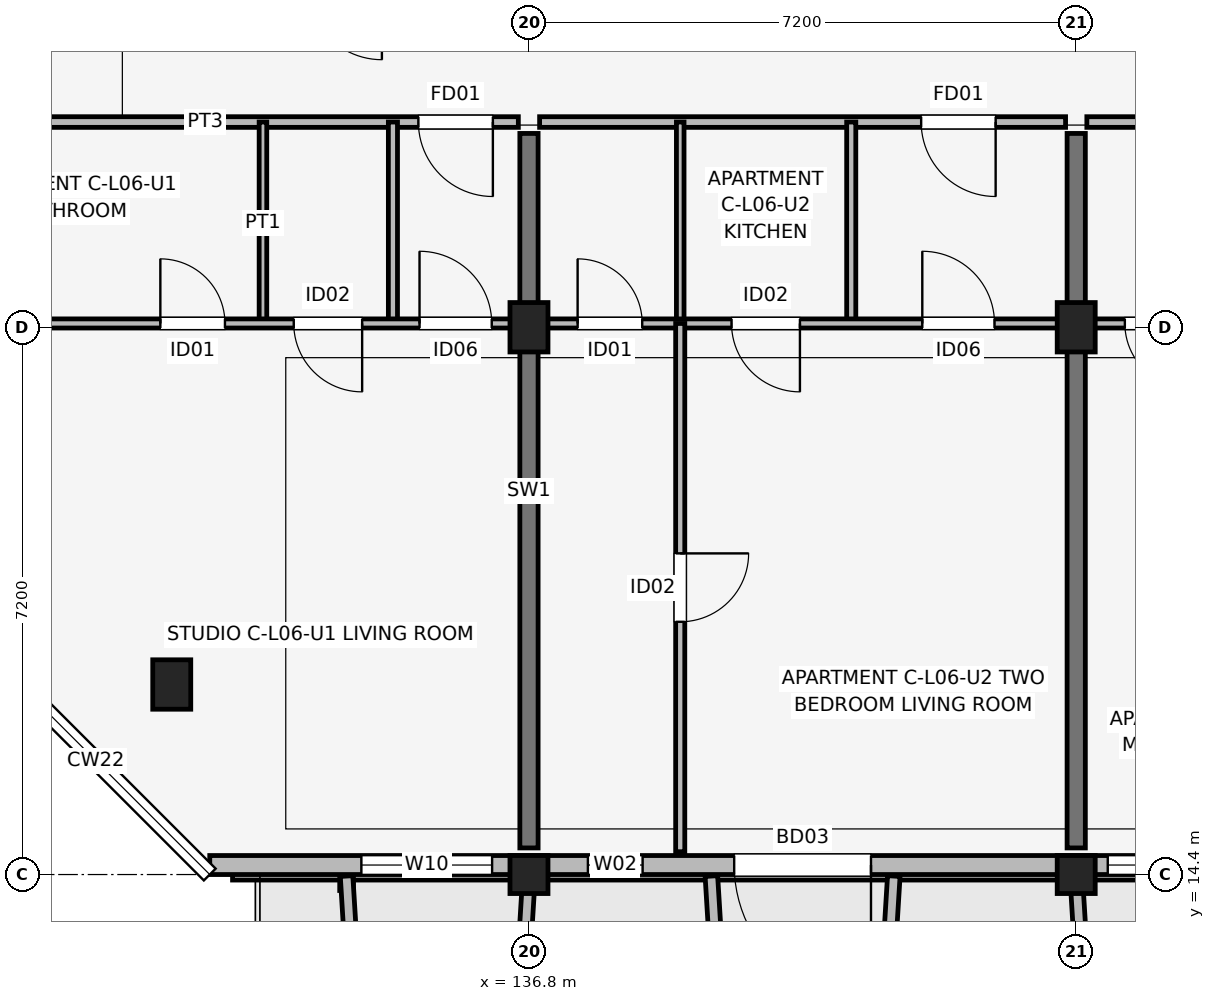
"""IFC4 building model, lengths in metres.
Left out: names, types, materials, properties, quantities, classifications, styles, units other than length and angle.
Written with IfcOpenShell. Run it as: python <this file> out.ifc"""

import sys

from ifc_helpers import new_model, si_unit, direction, frame, frame_2d, origin, origin_2d, place, context, subcontext, project, spatial, rectangle, extrude, element, fill, save


model = new_model("IFC4")
c1 = context("Model", 3, precision=1e-05, world=origin(), true_north=direction((0.0, 1.0)))
c2 = subcontext(c1, "Body", "Model", "MODEL_VIEW")
j1 = project(units=[si_unit("LENGTHUNIT", "METRE"), si_unit("PLANEANGLEUNIT", "RADIAN")], contexts=[c1])
p1 = place(None, origin())
s1 = spatial("IfcSite", under=j1, at=p1, CompositionType="ELEMENT")
p2 = place(p1, origin())
s2 = spatial("IfcBuilding", under=s1, at=p2, CompositionType="ELEMENT")
p3 = place(p2, frame((0.0, 0.0, 21.3)))
s3 = spatial("IfcBuildingStorey", under=s2, at=p3, CompositionType="ELEMENT", Elevation=21.3)
p4 = place(p3, frame((132.1, 16.9, 0.0), z_axis=(0.0, 0.0, 1.0), x_axis=(1.0, 0.0, 0.0)))
e1 = element("IfcColumn", 1, at=p4, inside=s3, PredefinedType="COLUMN", context=c2, shape_type="SweptSolid", body=[
    extrude(rectangle(XDim=0.5, YDim=0.65, at=origin_2d()), origin(), (0.0, 0.0, 1.0), 3.15),
])
p5 = place(p3, frame((136.8, 14.4, 0.0), z_axis=(0.0, 0.0, 1.0), x_axis=(1.0, 0.0, 0.0)))
e2 = element("IfcColumn", 2, at=p5, inside=s3, PredefinedType="COLUMN", context=c2, shape_type="SweptSolid", body=[
    extrude(rectangle(XDim=0.5, YDim=0.5, at=origin_2d()), origin(), (0.0, 0.0, 1.0), 3.15),
])
p6 = place(p3, frame((136.8, 21.6, 0.0), z_axis=(0.0, 0.0, 1.0), x_axis=(1.0, 0.0, 0.0)))
e3 = element("IfcColumn", 3, at=p6, inside=s3, PredefinedType="COLUMN", context=c2, shape_type="SweptSolid", body=[
    extrude(rectangle(XDim=0.5, YDim=0.65, at=origin_2d()), origin(), (0.0, 0.0, 1.0), 3.15),
])
p7 = place(p3, frame((144.0, 14.4, 0.0), z_axis=(0.0, 0.0, 1.0), x_axis=(1.0, 0.0, 0.0)))
e4 = element("IfcColumn", 4, at=p7, inside=s3, PredefinedType="COLUMN", context=c2, shape_type="SweptSolid", body=[
    extrude(rectangle(XDim=0.5, YDim=0.5, at=origin_2d()), origin(), (0.0, 0.0, 1.0), 3.15),
])
p8 = place(p3, frame((144.0, 21.6, 0.0), z_axis=(0.0, 0.0, 1.0), x_axis=(1.0, 0.0, 0.0)))
e5 = element("IfcColumn", 5, at=p8, inside=s3, PredefinedType="COLUMN", context=c2, shape_type="SweptSolid", body=[
    extrude(rectangle(XDim=0.5, YDim=0.65, at=origin_2d()), origin(), (0.0, 0.0, 1.0), 3.15),
])
for number, where, z_axis, x_axis in (
    (6, (136.8, 14.75, 0.0), (0.0, 0.0, 1.0), (0.0, 1.0, 0.0)),
    (7, (144.0, 14.75, 0.0), (0.0, 0.0, 1.0), (0.0, 1.0, 0.0)),
):
    element("IfcWall", number, at=place(p3, frame(where, z_axis=z_axis, x_axis=x_axis)), inside=s3, PredefinedType="SHEAR", context=c2, shape_type="SweptSolid", body=[
        extrude(rectangle(XDim=9.4, YDim=0.24, at=frame_2d((4.7, 0.0))), origin(), (0.0, 0.0, 1.0), 3.15),
    ])
p9 = place(p3, frame((132.6, 14.525, 0.0), z_axis=(0.0, 0.0, 1.0), x_axis=(1.0, 0.0, 0.0)))
e8 = element("IfcWall", 8, at=p9, inside=s3, PredefinedType="SOLIDWALL", context=c2, shape_type="SweptSolid", body=[
    extrude(rectangle(XDim=30.0, YDim=0.25, at=frame_2d((15.0, 0.0))), origin(), (0.0, 0.0, 1.0), 2.43),
])
p10 = place(p9, frame((8.7, 0.0, 0.0), z_axis=(0.0, 0.0, 1.0), x_axis=(-1.0, 0.0, 0.0)))
e9 = element("IfcOpeningElement", 9, at=p10, cuts=e8, PredefinedType="OPENING", context=c2, shape_type="SweptSolid", body=[
    extrude(rectangle(XDim=1.8, YDim=2.15, at=frame_2d((0.9, 1.075))), frame((0.0, 0.135, 0.0), z_axis=(0.0, -1.0, 0.0), x_axis=(1.0, 0.0, 0.0)), (0.0, 0.0, 1.0), 0.27),
])
p11 = place(p9, frame((23.025, 0.0, 0.0), z_axis=(0.0, 0.0, 1.0), x_axis=(-1.0, 0.0, 0.0)))
e10 = element("IfcOpeningElement", 10, at=p11, cuts=e8, PredefinedType="OPENING", context=c2, shape_type="SweptSolid", body=[
    extrude(rectangle(XDim=1.65, YDim=2.15, at=frame_2d((0.825, 1.075))), frame((0.0, 0.135, 0.0), z_axis=(0.0, -1.0, 0.0), x_axis=(1.0, 0.0, 0.0)), (0.0, 0.0, 1.0), 0.27),
])
p12 = place(p9, frame((1.995, 0.0, 0.7)))
e11 = element("IfcOpeningElement", 11, at=p12, cuts=e8, PredefinedType="OPENING", context=c2, shape_type="SweptSolid", body=[
    extrude(rectangle(XDim=1.72, YDim=1.6, at=frame_2d((0.86, 0.8))), frame((0.0, 0.135, 0.0), z_axis=(0.0, -1.0, 0.0), x_axis=(1.0, 0.0, 0.0)), (0.0, 0.0, 1.0), 0.27),
])
p13 = place(p9, frame((4.975, 0.0, 0.75)))
e12 = element("IfcOpeningElement", 12, at=p13, cuts=e8, PredefinedType="OPENING", context=c2, shape_type="SweptSolid", body=[
    extrude(rectangle(XDim=0.72, YDim=1.35, at=frame_2d((0.36, 0.675))), frame((0.0, 0.135, 0.0), z_axis=(0.0, -1.0, 0.0), x_axis=(1.0, 0.0, 0.0)), (0.0, 0.0, 1.0), 0.27),
])
p14 = place(p9, frame((11.815, 0.0, 0.7)))
e13 = element("IfcOpeningElement", 13, at=p14, cuts=e8, PredefinedType="OPENING", context=c2, shape_type="SweptSolid", body=[
    extrude(rectangle(XDim=1.86, YDim=1.6, at=frame_2d((0.93, 0.8))), frame((0.0, 0.135, 0.0), z_axis=(0.0, -1.0, 0.0), x_axis=(1.0, 0.0, 0.0)), (0.0, 0.0, 1.0), 0.27),
])
p15 = place(p9, frame((16.765, 0.0, 0.75)))
e14 = element("IfcOpeningElement", 14, at=p15, cuts=e8, PredefinedType="OPENING", context=c2, shape_type="SweptSolid", body=[
    extrude(rectangle(XDim=0.98, YDim=1.45, at=frame_2d((0.49, 0.725))), frame((0.0, 0.135, 0.0), z_axis=(0.0, -1.0, 0.0), x_axis=(1.0, 0.0, 0.0)), (0.0, 0.0, 1.0), 0.27),
])
p16 = place(p9, frame((19.185, 0.0, 0.75)))
e15 = element("IfcOpeningElement", 15, at=p16, cuts=e8, PredefinedType="OPENING", context=c2, shape_type="SweptSolid", body=[
    extrude(rectangle(XDim=1.1, YDim=1.5, at=frame_2d((0.55, 0.75))), frame((0.0, 0.135, 0.0), z_axis=(0.0, -1.0, 0.0), x_axis=(1.0, 0.0, 0.0)), (0.0, 0.0, 1.0), 0.27),
])
p17 = place(p9, frame((26.325, 0.0, 0.75)))
e16 = element("IfcOpeningElement", 16, at=p17, cuts=e8, PredefinedType="OPENING", context=c2, shape_type="SweptSolid", body=[
    extrude(rectangle(XDim=1.22, YDim=1.5, at=frame_2d((0.61, 0.75))), frame((0.0, 0.135, 0.0), z_axis=(0.0, -1.0, 0.0), x_axis=(1.0, 0.0, 0.0)), (0.0, 0.0, 1.0), 0.27),
])
for number, where, z_axis, x_axis in (
    (17, (134.4, 14.38, 0.0), (0.0, 0.0, 1.0), (0.061, -0.998, 0.0)),
    (18, (136.8, 14.38, 0.0), (0.0, 0.0, 1.0), (-0.061, -0.998, 0.0)),
):
    element("IfcWall", number, at=place(p3, frame(where, z_axis=z_axis, x_axis=x_axis)), inside=s3, PredefinedType="ELEMENTEDWALL", context=c2, shape_type="SweptSolid", body=[
        extrude(rectangle(XDim=1.964, YDim=0.165, at=frame_2d((0.982, 0.0))), origin(), (0.0, 0.0, 1.0), 2.95),
    ])
for number, where, z_axis, x_axis in (
    (19, (139.2, 14.38, 0.0), (0.0, 0.0, 1.0), (0.061, -0.998, 0.0)),
    (20, (141.6, 14.38, 0.0), (0.0, 0.0, 1.0), (-0.061, -0.998, 0.0)),
):
    element("IfcWall", number, at=place(p3, frame(where, z_axis=z_axis, x_axis=x_axis)), inside=s3, PredefinedType="ELEMENTEDWALL", context=c2, shape_type="SweptSolid", body=[
        extrude(rectangle(XDim=1.964, YDim=0.165, at=frame_2d((0.982, 0.0))), origin(), (0.0, 0.0, 1.0), 2.58),
    ])
p18 = place(p3, frame((144.0, 14.38, 0.0), z_axis=(0.0, 0.0, 1.0), x_axis=(0.061170732449, -0.998127317276, 0.0)))
e21 = element("IfcWall", 21, at=p18, inside=s3, PredefinedType="ELEMENTEDWALL", context=c2, shape_type="SweptSolid", body=[
    extrude(rectangle(XDim=1.964, YDim=0.165, at=frame_2d((0.982, 0.0))), origin(), (0.0, 0.0, 1.0), 2.95),
])
p19 = place(p3, frame((129.74, 24.3, 0.0), z_axis=(0.0, 0.0, 1.0), x_axis=(1.0, 0.0, 0.0)))
e22 = element("IfcWall", 22, at=p19, inside=s3, PredefinedType="PARTITIONING", context=c2, shape_type="SweptSolid", body=[
    extrude(rectangle(XDim=6.92, YDim=0.14, at=frame_2d((3.46, 0.0))), origin(), (0.0, 0.0, 1.0), 2.38),
])
p20 = place(p19, frame((6.585, 0.0, 0.0), z_axis=(0.0, 0.0, 1.0), x_axis=(-1.0, 0.0, 0.0)))
e23 = element("IfcOpeningElement", 23, at=p20, cuts=e22, PredefinedType="OPENING", context=c2, shape_type="SweptSolid", body=[
    extrude(rectangle(XDim=0.98, YDim=2.1, at=frame_2d((0.49, 1.05))), frame((0.0, 0.08, 0.0), z_axis=(0.0, -1.0, 0.0), x_axis=(1.0, 0.0, 0.0)), (0.0, 0.0, 1.0), 0.16),
])
p21 = place(p3, frame((133.3, 21.65, 0.0), z_axis=(0.0, 0.0, 1.0), x_axis=(0.0, 1.0, 0.0)))
e24 = element("IfcWall", 24, at=p21, inside=s3, PredefinedType="PARTITIONING", context=c2, shape_type="SweptSolid", body=[
    extrude(rectangle(XDim=2.65, YDim=0.1, at=frame_2d((1.325, 0.0))), origin(), (0.0, 0.0, 1.0), 2.38),
])
p22 = place(p3, frame((135.01, 21.65, 0.0), z_axis=(0.0, 0.0, 1.0), x_axis=(0.0, 1.0, 0.0)))
e25 = element("IfcWall", 25, at=p22, inside=s3, PredefinedType="PARTITIONING", context=c2, shape_type="SweptSolid", body=[
    extrude(rectangle(XDim=2.65, YDim=0.12, at=frame_2d((1.325, 0.0))), origin(), (0.0, 0.0, 1.0), 2.38),
])
p23 = place(p3, frame((129.74, 21.65, 0.0), z_axis=(0.0, 0.0, 1.0), x_axis=(1.0, 0.0, 0.0)))
e26 = element("IfcWall", 26, at=p23, inside=s3, PredefinedType="PARTITIONING", context=c2, shape_type="SweptSolid", body=[
    extrude(rectangle(XDim=6.92, YDim=0.12, at=frame_2d((3.46, 0.0))), origin(), (0.0, 0.0, 1.0), 2.38),
])
p24 = place(p23, frame((2.21, 0.0, 0.0)))
e27 = element("IfcOpeningElement", 27, at=p24, cuts=e26, PredefinedType="OPENING", context=c2, shape_type="SweptSolid", body=[
    extrude(rectangle(XDim=0.85, YDim=2.08, at=frame_2d((0.425, 1.04))), frame((0.0, 0.07, 0.0), z_axis=(0.0, -1.0, 0.0), x_axis=(1.0, 0.0, 0.0)), (0.0, 0.0, 1.0), 0.14),
])
p25 = place(p23, frame((4.865, 0.0, 0.0), z_axis=(0.0, 0.0, 1.0), x_axis=(-1.0, 0.0, 0.0)))
e28 = element("IfcOpeningElement", 28, at=p25, cuts=e26, PredefinedType="OPENING", context=c2, shape_type="SweptSolid", body=[
    extrude(rectangle(XDim=0.9, YDim=2.08, at=frame_2d((0.45, 1.04))), frame((0.0, 0.07, 0.0), z_axis=(0.0, -1.0, 0.0), x_axis=(1.0, 0.0, 0.0)), (0.0, 0.0, 1.0), 0.14),
])
p26 = place(p23, frame((5.62, 0.0, 0.0)))
e29 = element("IfcOpeningElement", 29, at=p26, cuts=e26, PredefinedType="OPENING", context=c2, shape_type="SweptSolid", body=[
    extrude(rectangle(XDim=0.95, YDim=2.08, at=frame_2d((0.475, 1.04))), frame((0.0, 0.07, 0.0), z_axis=(0.0, -1.0, 0.0), x_axis=(1.0, 0.0, 0.0)), (0.0, 0.0, 1.0), 0.14),
])
p27 = place(p3, frame((136.94, 24.3, 0.0), z_axis=(0.0, 0.0, 1.0), x_axis=(1.0, 0.0, 0.0)))
e30 = element("IfcWall", 30, at=p27, inside=s3, PredefinedType="PARTITIONING", context=c2, shape_type="SweptSolid", body=[
    extrude(rectangle(XDim=6.92, YDim=0.14, at=frame_2d((3.46, 0.0))), origin(), (0.0, 0.0, 1.0), 2.38),
])
p28 = place(p27, frame((6.0, 0.0, 0.0), z_axis=(0.0, 0.0, 1.0), x_axis=(-1.0, 0.0, 0.0)))
e31 = element("IfcOpeningElement", 31, at=p28, cuts=e30, PredefinedType="OPENING", context=c2, shape_type="SweptSolid", body=[
    extrude(rectangle(XDim=0.98, YDim=2.1, at=frame_2d((0.49, 1.05))), frame((0.0, 0.08, 0.0), z_axis=(0.0, -1.0, 0.0), x_axis=(1.0, 0.0, 0.0)), (0.0, 0.0, 1.0), 0.16),
])
p29 = place(p3, frame((138.79, 21.65, 0.0), z_axis=(0.0, 0.0, 1.0), x_axis=(0.0, 1.0, 0.0)))
e32 = element("IfcWall", 32, at=p29, inside=s3, PredefinedType="PARTITIONING", context=c2, shape_type="SweptSolid", body=[
    extrude(rectangle(XDim=2.65, YDim=0.1, at=frame_2d((1.325, 0.0))), origin(), (0.0, 0.0, 1.0), 2.38),
])
p30 = place(p3, frame((141.04, 21.65, 0.0), z_axis=(0.0, 0.0, 1.0), x_axis=(0.0, 1.0, 0.0)))
e33 = element("IfcWall", 33, at=p30, inside=s3, PredefinedType="PARTITIONING", context=c2, shape_type="SweptSolid", body=[
    extrude(rectangle(XDim=2.65, YDim=0.12, at=frame_2d((1.325, 0.0))), origin(), (0.0, 0.0, 1.0), 2.38),
])
p31 = place(p3, frame((136.94, 21.65, 0.0), z_axis=(0.0, 0.0, 1.0), x_axis=(1.0, 0.0, 0.0)))
e34 = element("IfcWall", 34, at=p31, inside=s3, PredefinedType="PARTITIONING", context=c2, shape_type="SweptSolid", body=[
    extrude(rectangle(XDim=6.92, YDim=0.12, at=frame_2d((3.46, 0.0))), origin(), (0.0, 0.0, 1.0), 2.38),
])
p32 = place(p31, frame((0.5, 0.0, 0.0)))
e35 = element("IfcOpeningElement", 35, at=p32, cuts=e34, PredefinedType="OPENING", context=c2, shape_type="SweptSolid", body=[
    extrude(rectangle(XDim=0.85, YDim=2.08, at=frame_2d((0.425, 1.04))), frame((0.0, 0.07, 0.0), z_axis=(0.0, -1.0, 0.0), x_axis=(1.0, 0.0, 0.0)), (0.0, 0.0, 1.0), 0.14),
])
p33 = place(p31, frame((3.425, 0.0, 0.0), z_axis=(0.0, 0.0, 1.0), x_axis=(-1.0, 0.0, 0.0)))
e36 = element("IfcOpeningElement", 36, at=p33, cuts=e34, PredefinedType="OPENING", context=c2, shape_type="SweptSolid", body=[
    extrude(rectangle(XDim=0.9, YDim=2.08, at=frame_2d((0.45, 1.04))), frame((0.0, 0.07, 0.0), z_axis=(0.0, -1.0, 0.0), x_axis=(1.0, 0.0, 0.0)), (0.0, 0.0, 1.0), 0.14),
])
p34 = place(p31, frame((5.035, 0.0, 0.0)))
e37 = element("IfcOpeningElement", 37, at=p34, cuts=e34, PredefinedType="OPENING", context=c2, shape_type="SweptSolid", body=[
    extrude(rectangle(XDim=0.95, YDim=2.08, at=frame_2d((0.475, 1.04))), frame((0.0, 0.07, 0.0), z_axis=(0.0, -1.0, 0.0), x_axis=(1.0, 0.0, 0.0)), (0.0, 0.0, 1.0), 0.14),
])
p35 = place(p3, frame((138.79, 14.7, 0.0), z_axis=(0.0, 0.0, 1.0), x_axis=(0.0, 1.0, 0.0)))
e38 = element("IfcWall", 38, at=p35, inside=s3, PredefinedType="PARTITIONING", context=c2, shape_type="SweptSolid", body=[
    extrude(rectangle(XDim=6.95, YDim=0.12, at=frame_2d((3.475, 0.0))), origin(), (0.0, 0.0, 1.0), 2.38),
])
p36 = place(p35, frame((3.925, 0.0, 0.0), z_axis=(0.0, 0.0, 1.0), x_axis=(-1.0, 0.0, 0.0)))
e39 = element("IfcOpeningElement", 39, at=p36, cuts=e38, PredefinedType="OPENING", context=c2, shape_type="SweptSolid", body=[
    extrude(rectangle(XDim=0.9, YDim=2.08, at=frame_2d((0.45, 1.04))), frame((0.0, 0.07, 0.0), z_axis=(0.0, -1.0, 0.0), x_axis=(1.0, 0.0, 0.0)), (0.0, 0.0, 1.0), 0.14),
])
p37 = place(p3, frame((144.14, 24.3, 0.0), z_axis=(0.0, 0.0, 1.0), x_axis=(1.0, 0.0, 0.0)))
e40 = element("IfcWall", 40, at=p37, inside=s3, PredefinedType="PARTITIONING", context=c2, shape_type="SweptSolid", body=[
    extrude(rectangle(XDim=6.92, YDim=0.14, at=frame_2d((3.46, 0.0))), origin(), (0.0, 0.0, 1.0), 2.38),
])
p38 = place(p37, frame((4.87, 0.0, 0.0)))
e41 = element("IfcOpeningElement", 41, at=p38, cuts=e40, PredefinedType="OPENING", context=c2, shape_type="SweptSolid", body=[
    extrude(rectangle(XDim=0.98, YDim=2.1, at=frame_2d((0.49, 1.05))), frame((0.0, 0.08, 0.0), z_axis=(0.0, -1.0, 0.0), x_axis=(1.0, 0.0, 0.0)), (0.0, 0.0, 1.0), 0.16),
])
p39 = place(p3, frame((144.14, 21.65, 0.0), z_axis=(0.0, 0.0, 1.0), x_axis=(1.0, 0.0, 0.0)))
e42 = element("IfcWall", 42, at=p39, inside=s3, PredefinedType="PARTITIONING", context=c2, shape_type="SweptSolid", body=[
    extrude(rectangle(XDim=6.92, YDim=0.12, at=frame_2d((3.46, 0.0))), origin(), (0.0, 0.0, 1.0), 2.38),
])
p40 = place(p39, frame((1.35, 0.0, 0.0), z_axis=(0.0, 0.0, 1.0), x_axis=(-1.0, 0.0, 0.0)))
e43 = element("IfcOpeningElement", 43, at=p40, cuts=e42, PredefinedType="OPENING", context=c2, shape_type="SweptSolid", body=[
    extrude(rectangle(XDim=0.85, YDim=2.08, at=frame_2d((0.425, 1.04))), frame((0.0, 0.07, 0.0), z_axis=(0.0, -1.0, 0.0), x_axis=(1.0, 0.0, 0.0)), (0.0, 0.0, 1.0), 0.14),
])
p41 = place(p39, frame((2.375, 0.0, 0.0)))
e44 = element("IfcOpeningElement", 44, at=p41, cuts=e42, PredefinedType="OPENING", context=c2, shape_type="SweptSolid", body=[
    extrude(rectangle(XDim=0.9, YDim=2.08, at=frame_2d((0.45, 1.04))), frame((0.0, 0.07, 0.0), z_axis=(0.0, -1.0, 0.0), x_axis=(1.0, 0.0, 0.0)), (0.0, 0.0, 1.0), 0.14),
])
p42 = place(p39, frame((5.835, 0.0, 0.0), z_axis=(0.0, 0.0, 1.0), x_axis=(-1.0, 0.0, 0.0)))
e45 = element("IfcOpeningElement", 45, at=p42, cuts=e42, PredefinedType="OPENING", context=c2, shape_type="SweptSolid", body=[
    extrude(rectangle(XDim=0.95, YDim=2.08, at=frame_2d((0.475, 1.04))), frame((0.0, 0.07, 0.0), z_axis=(0.0, -1.0, 0.0), x_axis=(1.0, 0.0, 0.0)), (0.0, 0.0, 1.0), 0.14),
])
p43 = place(p10, origin())
e46 = element("IfcDoor", 46, at=p43, inside=s3, OperationType="SINGLE_SWING_RIGHT", PredefinedType="DOOR", context=c2, shape_type="SweptSolid", body=[
    extrude(rectangle(XDim=1.8, YDim=2.15, at=frame_2d((0.9, 1.075))), frame((0.0, 0.025, 0.0), z_axis=(0.0, -1.0, 0.0), x_axis=(1.0, 0.0, 0.0)), (0.0, 0.0, 1.0), 0.05),
])
fill(e9, e46)
p44 = place(p12, origin())
e47 = element("IfcWindow", 47, at=p44, inside=s3, PartitioningType="SINGLE_PANEL", PredefinedType="WINDOW", context=c2, shape_type="SweptSolid", body=[
    extrude(rectangle(XDim=1.72, YDim=1.6, at=frame_2d((0.86, 0.8))), frame((0.0, 0.03, 0.0), z_axis=(0.0, -1.0, 0.0), x_axis=(1.0, 0.0, 0.0)), (0.0, 0.0, 1.0), 0.06),
])
fill(e11, e47)
p45 = place(p13, origin())
e48 = element("IfcWindow", 48, at=p45, inside=s3, PartitioningType="SINGLE_PANEL", PredefinedType="WINDOW", context=c2, shape_type="SweptSolid", body=[
    extrude(rectangle(XDim=0.72, YDim=1.35, at=frame_2d((0.36, 0.675))), frame((0.0, 0.03, 0.0), z_axis=(0.0, -1.0, 0.0), x_axis=(1.0, 0.0, 0.0)), (0.0, 0.0, 1.0), 0.06),
])
fill(e12, e48)
p46 = place(p14, origin())
e49 = element("IfcWindow", 49, at=p46, inside=s3, PartitioningType="SINGLE_PANEL", PredefinedType="WINDOW", context=c2, shape_type="SweptSolid", body=[
    extrude(rectangle(XDim=1.86, YDim=1.6, at=frame_2d((0.93, 0.8))), frame((0.0, 0.03, 0.0), z_axis=(0.0, -1.0, 0.0), x_axis=(1.0, 0.0, 0.0)), (0.0, 0.0, 1.0), 0.06),
])
fill(e13, e49)
p47 = place(p20, origin())
e50 = element("IfcDoor", 50, at=p47, inside=s3, OperationType="SINGLE_SWING_RIGHT", PredefinedType="DOOR", context=c2, shape_type="SweptSolid", body=[
    extrude(rectangle(XDim=0.98, YDim=2.1, at=frame_2d((0.49, 1.05))), frame((0.0, 0.025, 0.0), z_axis=(0.0, -1.0, 0.0), x_axis=(1.0, 0.0, 0.0)), (0.0, 0.0, 1.0), 0.05),
])
fill(e23, e50)
p48 = place(p24, origin())
e51 = element("IfcDoor", 51, at=p48, inside=s3, OperationType="SINGLE_SWING_LEFT", PredefinedType="DOOR", context=c2, shape_type="SweptSolid", body=[
    extrude(rectangle(XDim=0.85, YDim=2.08, at=frame_2d((0.425, 1.04))), frame((0.0, 0.025, 0.0), z_axis=(0.0, -1.0, 0.0), x_axis=(1.0, 0.0, 0.0)), (0.0, 0.0, 1.0), 0.05),
])
fill(e27, e51)
p49 = place(p25, origin())
e52 = element("IfcDoor", 52, at=p49, inside=s3, OperationType="SINGLE_SWING_RIGHT", PredefinedType="DOOR", context=c2, shape_type="SweptSolid", body=[
    extrude(rectangle(XDim=0.9, YDim=2.08, at=frame_2d((0.45, 1.04))), frame((0.0, 0.025, 0.0), z_axis=(0.0, -1.0, 0.0), x_axis=(1.0, 0.0, 0.0)), (0.0, 0.0, 1.0), 0.05),
])
fill(e28, e52)
p50 = place(p26, origin())
e53 = element("IfcDoor", 53, at=p50, inside=s3, OperationType="SINGLE_SWING_LEFT", PredefinedType="DOOR", context=c2, shape_type="SweptSolid", body=[
    extrude(rectangle(XDim=0.95, YDim=2.08, at=frame_2d((0.475, 1.04))), frame((0.0, 0.025, 0.0), z_axis=(0.0, -1.0, 0.0), x_axis=(1.0, 0.0, 0.0)), (0.0, 0.0, 1.0), 0.05),
])
fill(e29, e53)
p51 = place(p28, origin())
e54 = element("IfcDoor", 54, at=p51, inside=s3, OperationType="SINGLE_SWING_RIGHT", PredefinedType="DOOR", context=c2, shape_type="SweptSolid", body=[
    extrude(rectangle(XDim=0.98, YDim=2.1, at=frame_2d((0.49, 1.05))), frame((0.0, 0.025, 0.0), z_axis=(0.0, -1.0, 0.0), x_axis=(1.0, 0.0, 0.0)), (0.0, 0.0, 1.0), 0.05),
])
fill(e31, e54)
p52 = place(p32, origin())
e55 = element("IfcDoor", 55, at=p52, inside=s3, OperationType="SINGLE_SWING_LEFT", PredefinedType="DOOR", context=c2, shape_type="SweptSolid", body=[
    extrude(rectangle(XDim=0.85, YDim=2.08, at=frame_2d((0.425, 1.04))), frame((0.0, 0.025, 0.0), z_axis=(0.0, -1.0, 0.0), x_axis=(1.0, 0.0, 0.0)), (0.0, 0.0, 1.0), 0.05),
])
fill(e35, e55)
p53 = place(p33, origin())
e56 = element("IfcDoor", 56, at=p53, inside=s3, OperationType="SINGLE_SWING_RIGHT", PredefinedType="DOOR", context=c2, shape_type="SweptSolid", body=[
    extrude(rectangle(XDim=0.9, YDim=2.08, at=frame_2d((0.45, 1.04))), frame((0.0, 0.025, 0.0), z_axis=(0.0, -1.0, 0.0), x_axis=(1.0, 0.0, 0.0)), (0.0, 0.0, 1.0), 0.05),
])
fill(e36, e56)
p54 = place(p34, origin())
e57 = element("IfcDoor", 57, at=p54, inside=s3, OperationType="SINGLE_SWING_LEFT", PredefinedType="DOOR", context=c2, shape_type="SweptSolid", body=[
    extrude(rectangle(XDim=0.95, YDim=2.08, at=frame_2d((0.475, 1.04))), frame((0.0, 0.025, 0.0), z_axis=(0.0, -1.0, 0.0), x_axis=(1.0, 0.0, 0.0)), (0.0, 0.0, 1.0), 0.05),
])
fill(e37, e57)
p55 = place(p36, origin())
e58 = element("IfcDoor", 58, at=p55, inside=s3, OperationType="SINGLE_SWING_RIGHT", PredefinedType="DOOR", context=c2, shape_type="SweptSolid", body=[
    extrude(rectangle(XDim=0.9, YDim=2.08, at=frame_2d((0.45, 1.04))), frame((0.0, 0.025, 0.0), z_axis=(0.0, -1.0, 0.0), x_axis=(1.0, 0.0, 0.0)), (0.0, 0.0, 1.0), 0.05),
])
fill(e39, e58)
p56 = place(p40, origin())
e59 = element("IfcDoor", 59, at=p56, inside=s3, OperationType="SINGLE_SWING_RIGHT", PredefinedType="DOOR", context=c2, shape_type="SweptSolid", body=[
    extrude(rectangle(XDim=0.85, YDim=2.08, at=frame_2d((0.425, 1.04))), frame((0.0, 0.025, 0.0), z_axis=(0.0, -1.0, 0.0), x_axis=(1.0, 0.0, 0.0)), (0.0, 0.0, 1.0), 0.05),
])
fill(e43, e59)
save(model, sys.argv[1])
